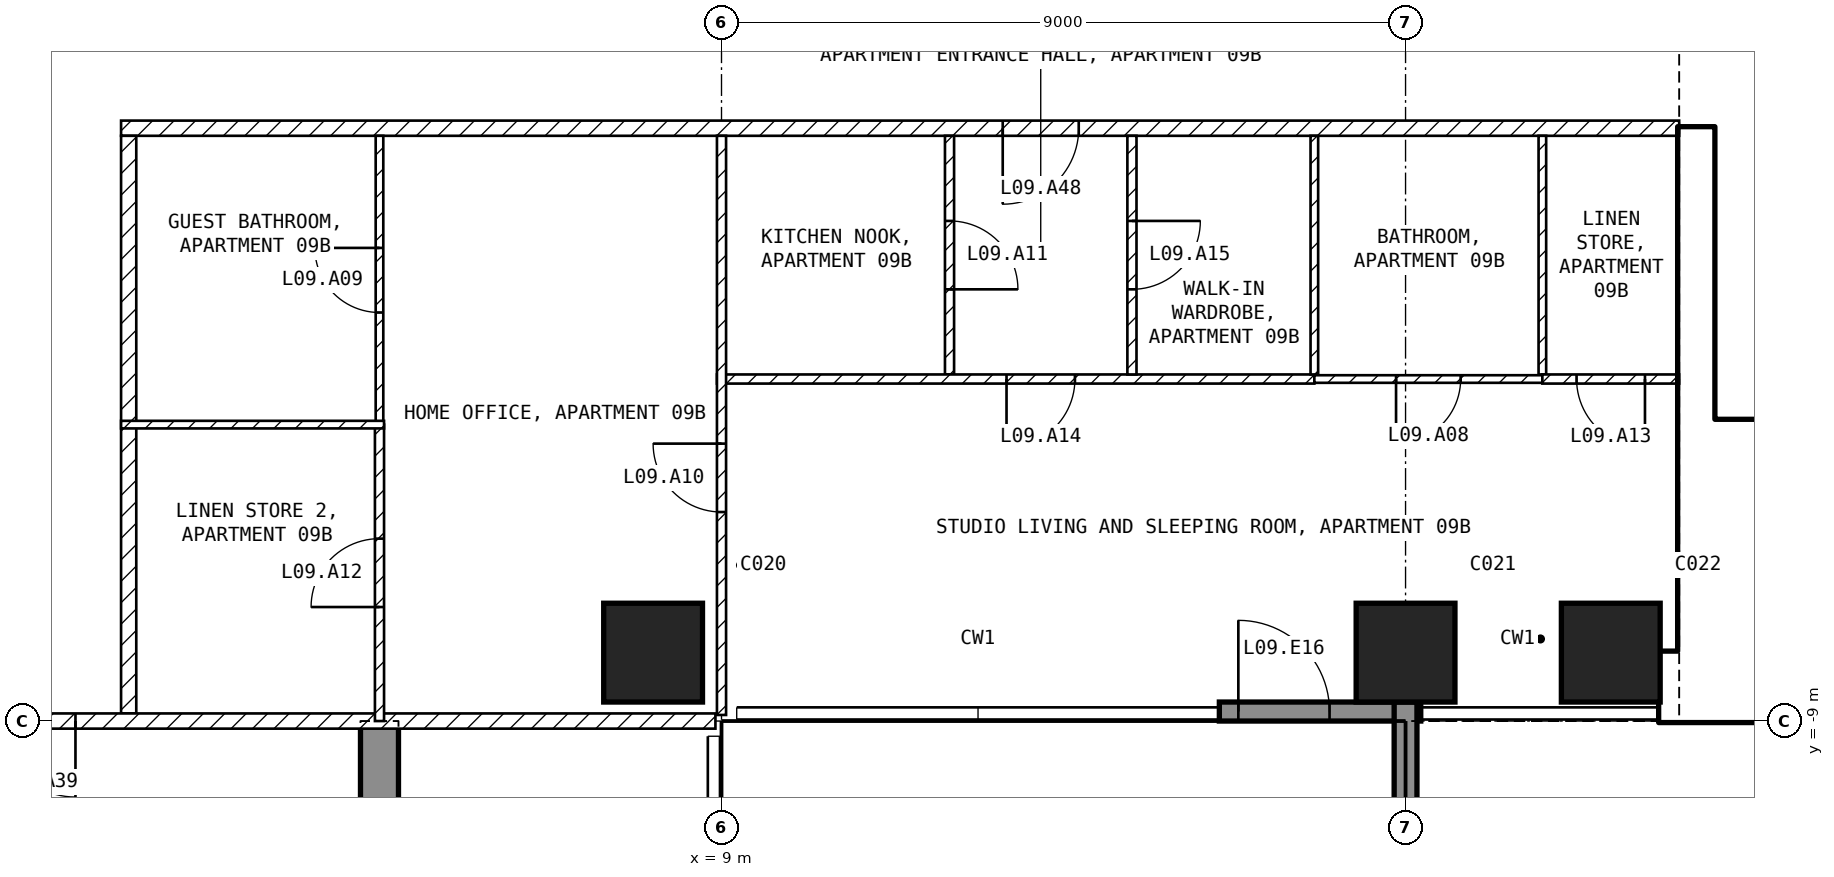
"""IFC4 building model, lengths in metres.
Left out: names, types, materials, properties, quantities, classifications, styles, units other than length and angle.
Written with IfcOpenShell. Run it as: python <this file> out.ifc"""

import sys

from ifc_helpers import new_model, si_unit, direction, frame, frame_2d, origin, origin_2d, place, context, subcontext, project, spatial, polyline, rectangle, outline, extrude, element, fill, save


model = new_model("IFC4")
c1 = context("Model", 3, precision=1e-05, world=origin(), true_north=direction((0.0, 1.0)))
c2 = subcontext(c1, "Body", "Model", "MODEL_VIEW")
j1 = project(units=[si_unit("LENGTHUNIT", "METRE"), si_unit("PLANEANGLEUNIT", "RADIAN")], contexts=[c1])
p1 = place(None, origin())
s1 = spatial("IfcSite", under=j1, at=p1, CompositionType="ELEMENT")
p2 = place(p1, origin())
s2 = spatial("IfcBuilding", under=s1, at=p2, CompositionType="ELEMENT")
p3 = place(p2, frame((0.0, 0.0, 50.5)))
s3 = spatial("IfcBuildingStorey", under=s2, at=p3, CompositionType="ELEMENT", Elevation=50.5)
for number, where, z_axis, x_axis in (
    (1, (8.1, -8.1, -0.25), (0.0, 0.0, 1.0), (1.0, 0.0, 0.0)),
    (2, (18.0, -8.1, -0.25), (0.0, 0.0, 1.0), (1.0, 0.0, 0.0)),
    (3, (20.7, -8.1, -0.25), (0.0, 0.0, 1.0), (1.0, 0.0, 0.0)),
):
    element("IfcColumn", number, at=place(p3, frame(where, z_axis=z_axis, x_axis=x_axis)), inside=s3, PredefinedType="COLUMN", context=c2, shape_type="SweptSolid", body=[
        extrude(rectangle(XDim=1.3, YDim=1.3, at=origin_2d()), origin(), (0.0, 0.0, 1.0), 3.5),
    ])
p4 = place(p3, frame((4.25, -25.45, -0.25), z_axis=(1.0, 0.0, 0.0), x_axis=(0.0, 1.0, 0.0)))
e4 = element("IfcWall", 4, at=p4, inside=s3, PredefinedType="SHEAR", context=c2, shape_type="SweptSolid", body=[
    extrude(outline(polyline([(0.0, 0.0), (4.15, 0.0), (4.15, 2.65), (6.55, 2.65), (6.55, 0.0), (11.95, 0.0), (11.95, 2.65), (14.35, 2.65), (14.35, 0.0), (16.45, 0.0), (16.45, 3.5), (0.0, 3.5), (0.0, 0.0)])), origin(), (0.0, 0.0, 1.0), 0.5),
])
p5 = place(p3, frame((15.55, -8.875, 0.0), z_axis=(0.0, 0.0, 1.0), x_axis=(1.0, 0.0, 0.0)))
e5 = element("IfcWall", 5, at=p5, inside=s3, PredefinedType="SOLIDWALL", context=c2, shape_type="SweptSolid", body=[
    extrude(rectangle(XDim=2.65, YDim=0.25, at=frame_2d((1.325, 0.0))), origin(), (0.0, 0.0, 1.0), 3.25),
])
p6 = place(p5, frame((0.25, 0.0, 0.0)))
e6 = element("IfcOpeningElement", 6, at=p6, cuts=e5, PredefinedType="OPENING", context=c2, shape_type="SweptSolid", body=[
    extrude(rectangle(XDim=1.2, YDim=2.4, at=frame_2d((0.6, 1.2))), frame((0.0, 0.135, 0.0), z_axis=(0.0, -1.0, 0.0), x_axis=(1.0, 0.0, 0.0)), (0.0, 0.0, 1.0), 0.27),
])
p7 = place(p3, frame((18.0, -8.75, 0.0), z_axis=(0.0, 0.0, 1.0), x_axis=(0.0, -1.0, 0.0)))
e7 = element("IfcWall", 7, at=p7, inside=s3, PredefinedType="SOLIDWALL", context=c2, shape_type="SweptSolid", body=[
    extrude(rectangle(XDim=2.95, YDim=0.3, at=frame_2d((1.475, 0.0))), origin(), (0.0, 0.0, 1.0), 3.25),
])
p8 = place(p3, frame((21.35, -8.55, 0.0), z_axis=(0.0, 0.0, 1.0), x_axis=(1.0, 0.0, 0.0)))
e8 = element("IfcWall", 8, at=p8, inside=s3, PredefinedType="SHEAR", context=c2, shape_type="SweptSolid", body=[
    extrude(rectangle(XDim=11.05, YDim=0.9, at=frame_2d((5.525, 0.0))), origin(), (0.0, 0.0, 1.0), 3.25),
])
p9 = place(p3, frame((21.825, -8.1, 0.0), z_axis=(0.0, 0.0, 1.0), x_axis=(0.0, 1.0, 0.0)))
e9 = element("IfcWall", 9, at=p9, inside=s3, PredefinedType="SHEAR", context=c2, shape_type="SweptSolid", body=[
    extrude(rectangle(XDim=6.9, YDim=0.45, at=frame_2d((3.45, 0.0))), origin(), (0.0, 0.0, 1.0), 3.25),
])
p10 = place(p3, frame((22.05, -5.15, 0.0), z_axis=(0.0, 0.0, 1.0), x_axis=(1.0, 0.0, 0.0)))
e10 = element("IfcWall", 10, at=p10, inside=s3, PredefinedType="SOLIDWALL", context=c2, shape_type="SweptSolid", body=[
    extrude(rectangle(XDim=6.3, YDim=0.2, at=frame_2d((3.15, 0.0))), origin(), (0.0, 0.0, 1.0), 3.25),
])
p11 = place(p10, frame((0.2, 0.0, 0.0)))
e11 = element("IfcOpeningElement", 11, at=p11, cuts=e10, PredefinedType="OPENING", context=c2, shape_type="SweptSolid", body=[
    extrude(rectangle(XDim=1.0, YDim=2.1, at=frame_2d((0.5, 1.05))), frame((0.0, 0.11, 0.0), z_axis=(0.0, -1.0, 0.0), x_axis=(1.0, 0.0, 0.0)), (0.0, 0.0, 1.0), 0.22),
])
p12 = place(p3, frame((21.6, -1.2, 0.0), z_axis=(0.0, 0.0, 1.0), x_axis=(-1.0, 0.0, 0.0)))
e12 = element("IfcWall", 12, at=p12, inside=s3, PredefinedType="PARTITIONING", context=c2, shape_type="SweptSolid", body=[
    extrude(rectangle(XDim=20.5, YDim=0.2, at=frame_2d((10.25, 0.0))), origin(), (0.0, 0.0, 1.0), 3.25),
])
p13 = place(p12, frame((7.9, 0.0, 0.0)))
e13 = element("IfcOpeningElement", 13, at=p13, cuts=e12, PredefinedType="OPENING", context=c2, shape_type="SweptSolid", body=[
    extrude(rectangle(XDim=1.0, YDim=2.1, at=frame_2d((0.5, 1.05))), frame((0.0, 0.11, 0.0), z_axis=(0.0, -1.0, 0.0), x_axis=(1.0, 0.0, 0.0)), (0.0, 0.0, 1.0), 0.22),
])
p14 = place(p3, frame((1.2, -1.3, 0.0), z_axis=(0.0, 0.0, 1.0), x_axis=(0.0, -1.0, 0.0)))
e14 = element("IfcWall", 14, at=p14, inside=s3, PredefinedType="PARTITIONING", context=c2, shape_type="SweptSolid", body=[
    extrude(rectangle(XDim=7.6, YDim=0.2, at=frame_2d((3.8, 0.0))), origin(), (0.0, 0.0, 1.0), 3.25),
])
p15 = place(p3, frame((8.92, -9.0, 0.0), z_axis=(0.0, 0.0, 1.0), x_axis=(-1.0, 0.0, 0.0)))
e15 = element("IfcWall", 15, at=p15, inside=s3, PredefinedType="PARTITIONING", context=c2, shape_type="SweptSolid", body=[
    extrude(rectangle(XDim=17.84, YDim=0.2, at=frame_2d((8.92, 0.0))), origin(), (0.0, 0.0, 1.0), 3.25),
])
p16 = place(p15, frame((8.42, 0.0, 0.0)))
e16 = element("IfcOpeningElement", 16, at=p16, cuts=e15, PredefinedType="OPENING", context=c2, shape_type="SweptSolid", body=[
    extrude(rectangle(XDim=1.0, YDim=2.1, at=frame_2d((0.5, 1.05))), frame((0.0, 0.11, 0.0), z_axis=(0.0, -1.0, 0.0), x_axis=(1.0, 0.0, 0.0)), (0.0, 0.0, 1.0), 0.22),
])
p17 = place(p3, frame((12.0, -1.3, 0.0), z_axis=(0.0, 0.0, 1.0), x_axis=(0.0, -1.0, 0.0)))
e17 = element("IfcWall", 17, at=p17, inside=s3, PredefinedType="PARTITIONING", context=c2, shape_type="SweptSolid", body=[
    extrude(rectangle(XDim=3.14, YDim=0.12, at=frame_2d((1.57, 0.0))), origin(), (0.0, 0.0, 1.0), 3.25),
])
p18 = place(p17, frame((1.12, 0.0, 0.0)))
e18 = element("IfcOpeningElement", 18, at=p18, cuts=e17, PredefinedType="OPENING", context=c2, shape_type="SweptSolid", body=[
    extrude(rectangle(XDim=0.9, YDim=2.1, at=frame_2d((0.45, 1.05))), frame((0.0, 0.07, 0.0), z_axis=(0.0, -1.0, 0.0), x_axis=(1.0, 0.0, 0.0)), (0.0, 0.0, 1.0), 0.14),
])
p19 = place(p3, frame((16.8, -4.5, 0.0), z_axis=(0.0, 0.0, 1.0), x_axis=(-1.0, 0.0, 0.0)))
e19 = element("IfcWall", 19, at=p19, inside=s3, PredefinedType="PARTITIONING", context=c2, shape_type="SweptSolid", body=[
    extrude(rectangle(XDim=7.86, YDim=0.12, at=frame_2d((3.93, 0.0))), origin(), (0.0, 0.0, 1.0), 3.25),
])
p20 = place(p19, frame((3.15, 0.0, 0.0)))
e20 = element("IfcOpeningElement", 20, at=p20, cuts=e19, PredefinedType="OPENING", context=c2, shape_type="SweptSolid", body=[
    extrude(rectangle(XDim=0.9, YDim=2.1, at=frame_2d((0.45, 1.05))), frame((0.0, 0.07, 0.0), z_axis=(0.0, -1.0, 0.0), x_axis=(1.0, 0.0, 0.0)), (0.0, 0.0, 1.0), 0.14),
])
p21 = place(p3, frame((9.0, -8.92, 0.0), z_axis=(0.0, 0.0, 1.0), x_axis=(0.0, 1.0, 0.0)))
e21 = element("IfcWall", 21, at=p21, inside=s3, PredefinedType="PARTITIONING", context=c2, shape_type="SweptSolid", body=[
    extrude(rectangle(XDim=7.62, YDim=0.12, at=frame_2d((3.81, 0.0))), origin(), (0.0, 0.0, 1.0), 3.25),
])
p22 = place(p21, frame((2.67, 0.0, 0.0)))
e22 = element("IfcOpeningElement", 22, at=p22, cuts=e21, PredefinedType="OPENING", context=c2, shape_type="SweptSolid", body=[
    extrude(rectangle(XDim=0.9, YDim=2.1, at=frame_2d((0.45, 1.05))), frame((0.0, 0.07, 0.0), z_axis=(0.0, -1.0, 0.0), x_axis=(1.0, 0.0, 0.0)), (0.0, 0.0, 1.0), 0.14),
])
p23 = place(p3, frame((14.4, -1.3, 0.0), z_axis=(0.0, 0.0, 1.0), x_axis=(0.0, -1.0, 0.0)))
e23 = element("IfcWall", 23, at=p23, inside=s3, PredefinedType="PARTITIONING", context=c2, shape_type="SweptSolid", body=[
    extrude(rectangle(XDim=3.14, YDim=0.12, at=frame_2d((1.57, 0.0))), origin(), (0.0, 0.0, 1.0), 3.25),
])
p24 = place(p23, frame((1.12, 0.0, 0.0)))
e24 = element("IfcOpeningElement", 24, at=p24, cuts=e23, PredefinedType="OPENING", context=c2, shape_type="SweptSolid", body=[
    extrude(rectangle(XDim=0.9, YDim=2.1, at=frame_2d((0.45, 1.05))), frame((0.0, 0.07, 0.0), z_axis=(0.0, -1.0, 0.0), x_axis=(1.0, 0.0, 0.0)), (0.0, 0.0, 1.0), 0.14),
])
for number, where, z_axis, x_axis in (
    (25, (16.8, -1.3, 0.0), (0.0, 0.0, 1.0), (0.0, -1.0, 0.0)),
    (26, (19.8, -1.3, 0.0), (0.0, 0.0, 1.0), (0.0, -1.0, 0.0)),
):
    element("IfcWall", number, at=place(p3, frame(where, z_axis=z_axis, x_axis=x_axis)), inside=s3, PredefinedType="PARTITIONING", context=c2, shape_type="SweptSolid", body=[
        extrude(rectangle(XDim=3.14, YDim=0.1, at=frame_2d((1.57, 0.0))), origin(), (0.0, 0.0, 1.0), 3.25),
    ])
p25 = place(p3, frame((19.8, -4.5, 0.0), z_axis=(0.0, 0.0, 1.0), x_axis=(-1.0, 0.0, 0.0)))
e27 = element("IfcWall", 27, at=p25, inside=s3, PredefinedType="PARTITIONING", context=c2, shape_type="SweptSolid", body=[
    extrude(rectangle(XDim=3.0, YDim=0.1, at=frame_2d((1.5, 0.0))), origin(), (0.0, 0.0, 1.0), 3.25),
])
p26 = place(p25, frame((1.075, 0.0, 0.0)))
e28 = element("IfcOpeningElement", 28, at=p26, cuts=e27, PredefinedType="OPENING", context=c2, shape_type="SweptSolid", body=[
    extrude(rectangle(XDim=0.85, YDim=2.1, at=frame_2d((0.425, 1.05))), frame((0.0, 0.06, 0.0), z_axis=(0.0, -1.0, 0.0), x_axis=(1.0, 0.0, 0.0)), (0.0, 0.0, 1.0), 0.12),
])
p27 = place(p3, frame((21.6, -4.5, 0.0), z_axis=(0.0, 0.0, 1.0), x_axis=(-1.0, 0.0, 0.0)))
e29 = element("IfcWall", 29, at=p27, inside=s3, PredefinedType="PARTITIONING", context=c2, shape_type="SweptSolid", body=[
    extrude(rectangle(XDim=1.8, YDim=0.12, at=frame_2d((0.9, 0.0))), origin(), (0.0, 0.0, 1.0), 3.25),
])
p28 = place(p27, frame((0.45, 0.0, 0.0)))
e30 = element("IfcOpeningElement", 30, at=p28, cuts=e29, PredefinedType="OPENING", context=c2, shape_type="SweptSolid", body=[
    extrude(rectangle(XDim=0.9, YDim=2.1, at=frame_2d((0.45, 1.05))), frame((0.0, 0.07, 0.0), z_axis=(0.0, -1.0, 0.0), x_axis=(1.0, 0.0, 0.0)), (0.0, 0.0, 1.0), 0.14),
])
p29 = place(p3, frame((4.5, -5.1, 0.0), z_axis=(0.0, 0.0, 1.0), x_axis=(0.0, 1.0, 0.0)))
e31 = element("IfcWall", 31, at=p29, inside=s3, PredefinedType="PARTITIONING", context=c2, shape_type="SweptSolid", body=[
    extrude(rectangle(XDim=3.8, YDim=0.1, at=frame_2d((1.9, 0.0))), origin(), (0.0, 0.0, 1.0), 3.25),
])
p30 = place(p29, frame((1.475, 0.0, 0.0)))
e32 = element("IfcOpeningElement", 32, at=p30, cuts=e31, PredefinedType="OPENING", context=c2, shape_type="SweptSolid", body=[
    extrude(rectangle(XDim=0.85, YDim=2.1, at=frame_2d((0.425, 1.05))), frame((0.0, 0.06, 0.0), z_axis=(0.0, -1.0, 0.0), x_axis=(1.0, 0.0, 0.0)), (0.0, 0.0, 1.0), 0.12),
])
p31 = place(p3, frame((4.5, -9.0, 0.0), z_axis=(0.0, 0.0, 1.0), x_axis=(0.0, 1.0, 0.0)))
e33 = element("IfcWall", 33, at=p31, inside=s3, PredefinedType="PARTITIONING", context=c2, shape_type="SweptSolid", body=[
    extrude(rectangle(XDim=3.9, YDim=0.12, at=frame_2d((1.95, 0.0))), origin(), (0.0, 0.0, 1.0), 3.25),
])
p32 = place(p31, frame((1.5, 0.0, 0.0)))
e34 = element("IfcOpeningElement", 34, at=p32, cuts=e33, PredefinedType="OPENING", context=c2, shape_type="SweptSolid", body=[
    extrude(rectangle(XDim=0.9, YDim=2.1, at=frame_2d((0.45, 1.05))), frame((0.0, 0.07, 0.0), z_axis=(0.0, -1.0, 0.0), x_axis=(1.0, 0.0, 0.0)), (0.0, 0.0, 1.0), 0.14),
])
p33 = place(p3, frame((4.56, -5.1, 0.0), z_axis=(0.0, 0.0, 1.0), x_axis=(-1.0, 0.0, 0.0)))
e35 = element("IfcWall", 35, at=p33, inside=s3, PredefinedType="PARTITIONING", context=c2, shape_type="SweptSolid", body=[
    extrude(rectangle(XDim=3.46, YDim=0.1, at=frame_2d((1.73, 0.0))), origin(), (0.0, 0.0, 1.0), 3.25),
])
p34 = place(p6, origin())
e36 = element("IfcDoor", 36, at=p34, inside=s3, OperationType="SINGLE_SWING_LEFT", PredefinedType="DOOR", context=c2, shape_type="SweptSolid", body=[
    extrude(rectangle(XDim=1.2, YDim=2.4, at=frame_2d((0.6, 1.2))), frame((0.0, 0.025, 0.0), z_axis=(0.0, -1.0, 0.0), x_axis=(1.0, 0.0, 0.0)), (0.0, 0.0, 1.0), 0.05),
])
fill(e6, e36)
p35 = place(p11, origin())
e37 = element("IfcDoor", 37, at=p35, inside=s3, OperationType="SINGLE_SWING_LEFT", PredefinedType="DOOR", context=c2, shape_type="SweptSolid", body=[
    extrude(rectangle(XDim=1.0, YDim=2.1, at=frame_2d((0.5, 1.05))), frame((0.0, 0.025, 0.0), z_axis=(0.0, -1.0, 0.0), x_axis=(1.0, 0.0, 0.0)), (0.0, 0.0, 1.0), 0.05),
])
fill(e11, e37)
p36 = place(p26, origin())
e38 = element("IfcDoor", 38, at=p36, inside=s3, OperationType="SINGLE_SWING_RIGHT", PredefinedType="DOOR", context=c2, shape_type="SweptSolid", body=[
    extrude(rectangle(XDim=0.85, YDim=2.1, at=frame_2d((0.425, 1.05))), frame((0.0, 0.025, 0.0), z_axis=(0.0, -1.0, 0.0), x_axis=(1.0, 0.0, 0.0)), (0.0, 0.0, 1.0), 0.05),
])
fill(e28, e38)
p37 = place(p30, origin())
e39 = element("IfcDoor", 39, at=p37, inside=s3, OperationType="SINGLE_SWING_RIGHT", PredefinedType="DOOR", context=c2, shape_type="SweptSolid", body=[
    extrude(rectangle(XDim=0.85, YDim=2.1, at=frame_2d((0.425, 1.05))), frame((0.0, 0.025, 0.0), z_axis=(0.0, -1.0, 0.0), x_axis=(1.0, 0.0, 0.0)), (0.0, 0.0, 1.0), 0.05),
])
fill(e32, e39)
p38 = place(p22, origin())
e40 = element("IfcDoor", 40, at=p38, inside=s3, OperationType="SINGLE_SWING_RIGHT", PredefinedType="DOOR", context=c2, shape_type="SweptSolid", body=[
    extrude(rectangle(XDim=0.9, YDim=2.1, at=frame_2d((0.45, 1.05))), frame((0.0, 0.025, 0.0), z_axis=(0.0, -1.0, 0.0), x_axis=(1.0, 0.0, 0.0)), (0.0, 0.0, 1.0), 0.05),
])
fill(e22, e40)
p39 = place(p18, origin())
e41 = element("IfcDoor", 41, at=p39, inside=s3, OperationType="SINGLE_SWING_RIGHT", PredefinedType="DOOR", context=c2, shape_type="SweptSolid", body=[
    extrude(rectangle(XDim=0.9, YDim=2.1, at=frame_2d((0.45, 1.05))), frame((0.0, 0.025, 0.0), z_axis=(0.0, -1.0, 0.0), x_axis=(1.0, 0.0, 0.0)), (0.0, 0.0, 1.0), 0.05),
])
fill(e18, e41)
p40 = place(p32, origin())
e42 = element("IfcDoor", 42, at=p40, inside=s3, OperationType="SINGLE_SWING_LEFT", PredefinedType="DOOR", context=c2, shape_type="SweptSolid", body=[
    extrude(rectangle(XDim=0.9, YDim=2.1, at=frame_2d((0.45, 1.05))), frame((0.0, 0.025, 0.0), z_axis=(0.0, -1.0, 0.0), x_axis=(1.0, 0.0, 0.0)), (0.0, 0.0, 1.0), 0.05),
])
fill(e34, e42)
p41 = place(p28, origin())
e43 = element("IfcDoor", 43, at=p41, inside=s3, OperationType="SINGLE_SWING_LEFT", PredefinedType="DOOR", context=c2, shape_type="SweptSolid", body=[
    extrude(rectangle(XDim=0.9, YDim=2.1, at=frame_2d((0.45, 1.05))), frame((0.0, 0.025, 0.0), z_axis=(0.0, -1.0, 0.0), x_axis=(1.0, 0.0, 0.0)), (0.0, 0.0, 1.0), 0.05),
])
fill(e30, e43)
p42 = place(p20, origin())
e44 = element("IfcDoor", 44, at=p42, inside=s3, OperationType="SINGLE_SWING_RIGHT", PredefinedType="DOOR", context=c2, shape_type="SweptSolid", body=[
    extrude(rectangle(XDim=0.9, YDim=2.1, at=frame_2d((0.45, 1.05))), frame((0.0, 0.025, 0.0), z_axis=(0.0, -1.0, 0.0), x_axis=(1.0, 0.0, 0.0)), (0.0, 0.0, 1.0), 0.05),
])
fill(e20, e44)
p43 = place(p24, origin())
e45 = element("IfcDoor", 45, at=p43, inside=s3, OperationType="SINGLE_SWING_LEFT", PredefinedType="DOOR", context=c2, shape_type="SweptSolid", body=[
    extrude(rectangle(XDim=0.9, YDim=2.1, at=frame_2d((0.45, 1.05))), frame((0.0, 0.025, 0.0), z_axis=(0.0, -1.0, 0.0), x_axis=(1.0, 0.0, 0.0)), (0.0, 0.0, 1.0), 0.05),
])
fill(e24, e45)
p44 = place(p16, origin())
e46 = element("IfcDoor", 46, at=p44, inside=s3, OperationType="SINGLE_SWING_LEFT", PredefinedType="DOOR", context=c2, shape_type="SweptSolid", body=[
    extrude(rectangle(XDim=1.0, YDim=2.1, at=frame_2d((0.5, 1.05))), frame((0.0, 0.025, 0.0), z_axis=(0.0, -1.0, 0.0), x_axis=(1.0, 0.0, 0.0)), (0.0, 0.0, 1.0), 0.05),
])
fill(e16, e46)
p45 = place(p13, origin())
e47 = element("IfcDoor", 47, at=p45, inside=s3, OperationType="SINGLE_SWING_RIGHT", PredefinedType="DOOR", context=c2, shape_type="SweptSolid", body=[
    extrude(rectangle(XDim=1.0, YDim=2.1, at=frame_2d((0.5, 1.05))), frame((0.0, 0.025, 0.0), z_axis=(0.0, -1.0, 0.0), x_axis=(1.0, 0.0, 0.0)), (0.0, 0.0, 1.0), 0.05),
])
fill(e13, e47)
save(model, sys.argv[1])
